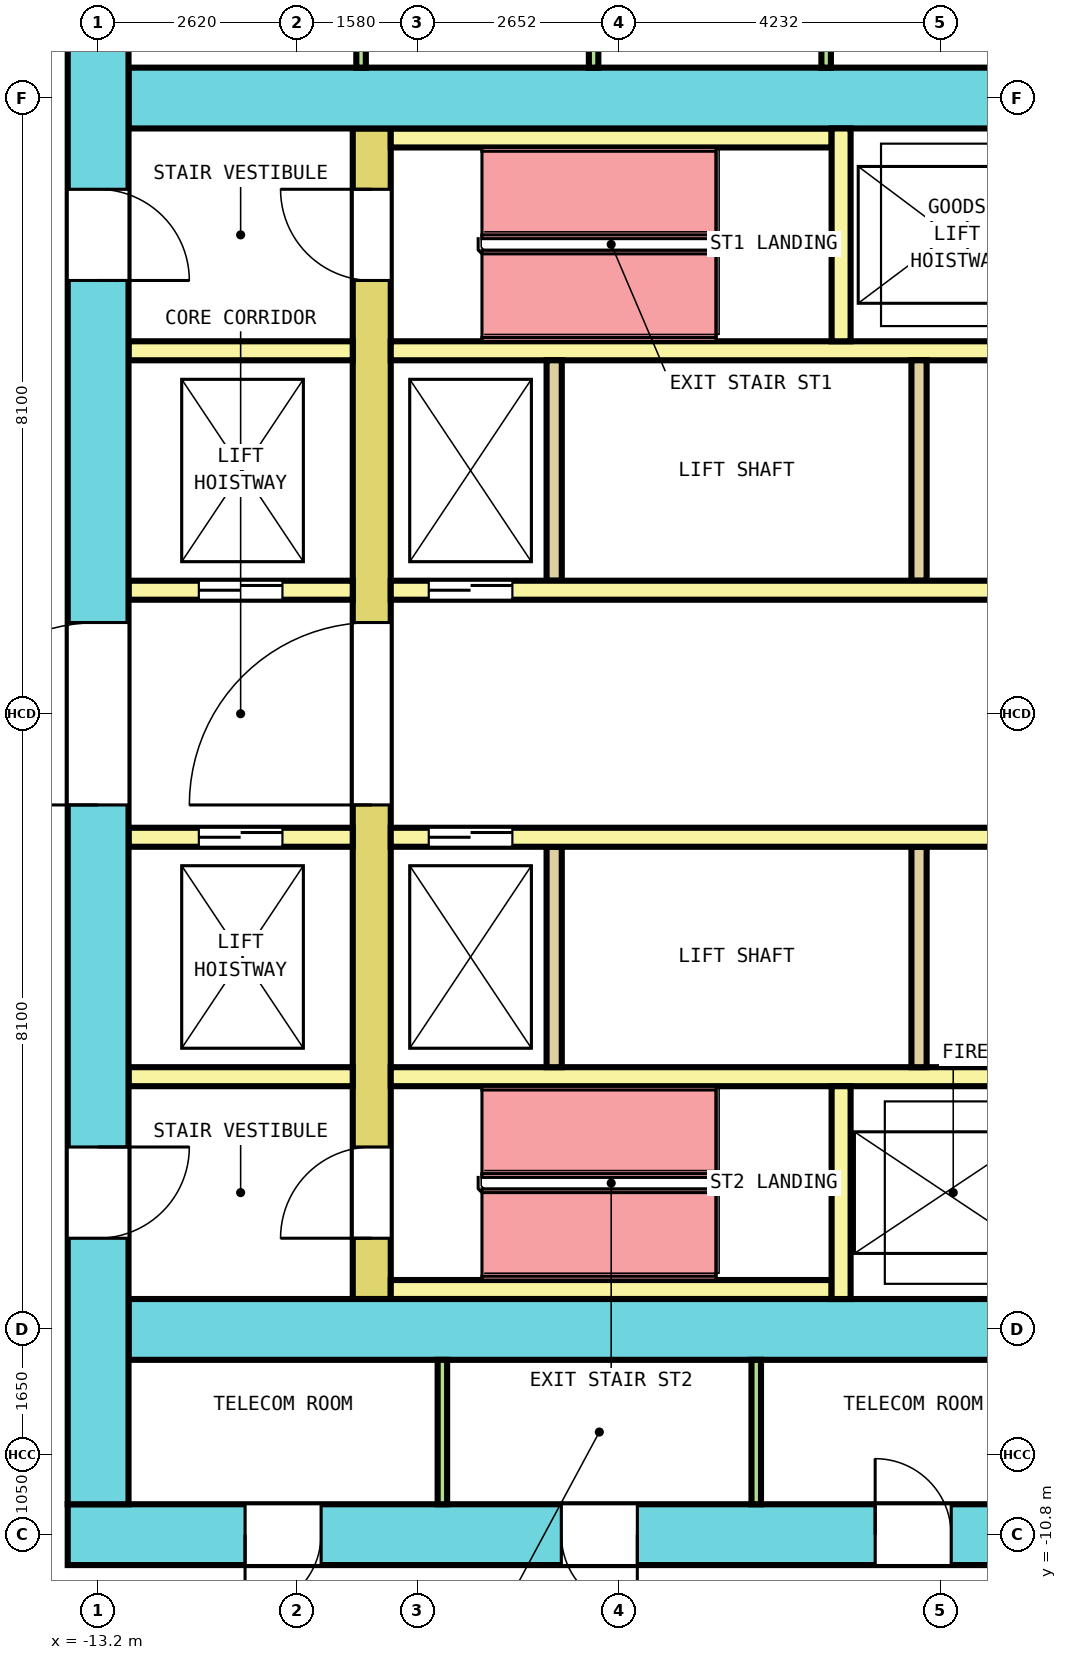
"""IFC4 building model, lengths in metres.
Left out: names, types, materials, properties, quantities, classifications, styles, units other than length and angle.
Written with IfcOpenShell. Run it as: python <this file> out.ifc"""

import sys

from ifc_helpers import new_model, si_unit, direction, frame, frame_2d, origin, place, context, subcontext, project, spatial, rectangle, extrude, element, fill, save


model = new_model("IFC4")
c1 = context("Model", 3, precision=1e-05, world=origin(), true_north=direction((0.0, 1.0)))
c2 = subcontext(c1, "Body", "Model", "MODEL_VIEW")
j1 = project(units=[si_unit("LENGTHUNIT", "METRE"), si_unit("PLANEANGLEUNIT", "RADIAN")], contexts=[c1])
p1 = place(None, origin())
s1 = spatial("IfcSite", under=j1, at=p1, CompositionType="ELEMENT")
p2 = place(p1, origin())
s2 = spatial("IfcBuilding", under=s1, at=p2, CompositionType="ELEMENT")
p3 = place(p2, frame((0.0, 0.0, 85.2)))
s3 = spatial("IfcBuildingStorey", under=s2, at=p3, CompositionType="ELEMENT", Elevation=85.2)
p4 = place(p3, frame((-13.6, -10.8, 0.0), z_axis=(0.0, 0.0, 1.0), x_axis=(1.0, 0.0, 0.0)))
e1 = element("IfcWall", 1, at=p4, inside=s3, PredefinedType="SHEAR", context=c2, shape_type="SweptSolid", body=[
    extrude(rectangle(XDim=27.2, YDim=0.8, at=frame_2d((13.6, 0.0))), origin(), (0.0, 0.0, 1.0), 4.1),
])
p5 = place(p4, frame((2.333, 0.0, 0.0)))
e2 = element("IfcOpeningElement", 2, at=p5, cuts=e1, PredefinedType="OPENING", context=c2, shape_type="SweptSolid", body=[
    extrude(rectangle(XDim=1.0, YDim=2.1, at=frame_2d((0.5, 1.05))), frame((0.0, 0.41, 0.0), z_axis=(0.0, -1.0, 0.0), x_axis=(1.0, 0.0, 0.0)), (0.0, 0.0, 1.0), 0.82),
])
p6 = place(p4, frame((6.494, 0.0, 0.0)))
e3 = element("IfcOpeningElement", 3, at=p6, cuts=e1, PredefinedType="OPENING", context=c2, shape_type="SweptSolid", body=[
    extrude(rectangle(XDim=1.0, YDim=2.1, at=frame_2d((0.5, 1.05))), frame((0.0, 0.41, 0.0), z_axis=(0.0, -1.0, 0.0), x_axis=(1.0, 0.0, 0.0)), (0.0, 0.0, 1.0), 0.82),
])
p7 = place(p4, frame((10.623, 0.0, 0.0)))
e4 = element("IfcOpeningElement", 4, at=p7, cuts=e1, PredefinedType="OPENING", context=c2, shape_type="SweptSolid", body=[
    extrude(rectangle(XDim=1.0, YDim=2.1, at=frame_2d((0.5, 1.05))), frame((0.0, 0.41, 0.0), z_axis=(0.0, -1.0, 0.0), x_axis=(1.0, 0.0, 0.0)), (0.0, 0.0, 1.0), 0.82),
])
p8 = place(p4, frame((19.16, 0.0, 0.0)))
e5 = element("IfcOpeningElement", 5, at=p8, cuts=e1, PredefinedType="OPENING", context=c2, shape_type="SweptSolid", body=[
    extrude(rectangle(XDim=1.0, YDim=2.1, at=frame_2d((0.5, 1.05))), frame((0.0, 0.41, 0.0), z_axis=(0.0, -1.0, 0.0), x_axis=(1.0, 0.0, 0.0)), (0.0, 0.0, 1.0), 0.82),
])
p9 = place(p4, frame((21.856, 0.0, 0.0)))
e6 = element("IfcOpeningElement", 6, at=p9, cuts=e1, PredefinedType="OPENING", context=c2, shape_type="SweptSolid", body=[
    extrude(rectangle(XDim=1.0, YDim=2.1, at=frame_2d((0.5, 1.05))), frame((0.0, 0.41, 0.0), z_axis=(0.0, -1.0, 0.0), x_axis=(1.0, 0.0, 0.0)), (0.0, 0.0, 1.0), 0.82),
])
p10 = place(p4, frame((24.583, 0.0, 0.0)))
e7 = element("IfcOpeningElement", 7, at=p10, cuts=e1, PredefinedType="OPENING", context=c2, shape_type="SweptSolid", body=[
    extrude(rectangle(XDim=1.0, YDim=2.1, at=frame_2d((0.5, 1.05))), frame((0.0, 0.41, 0.0), z_axis=(0.0, -1.0, 0.0), x_axis=(1.0, 0.0, 0.0)), (0.0, 0.0, 1.0), 0.82),
])
p11 = place(p4, frame((15.15, 0.0, 0.0)))
e8 = element("IfcOpeningElement", 8, at=p11, cuts=e1, PredefinedType="OPENING", context=c2, shape_type="SweptSolid", body=[
    extrude(rectangle(XDim=1.2, YDim=2.1, at=frame_2d((0.6, 1.05))), frame((0.0, 0.41, 0.0), z_axis=(0.0, -1.0, 0.0), x_axis=(1.0, 0.0, 0.0)), (0.0, 0.0, 1.0), 0.82),
])
p12 = place(p3, frame((-13.2, -10.4, 0.0), z_axis=(0.0, 0.0, 1.0), x_axis=(0.0, 1.0, 0.0)))
e9 = element("IfcWall", 9, at=p12, inside=s3, PredefinedType="SHEAR", context=c2, shape_type="SweptSolid", body=[
    extrude(rectangle(XDim=20.8, YDim=0.8, at=frame_2d((10.4, 0.0))), origin(), (0.0, 0.0, 1.0), 4.1),
])
p13 = place(p12, frame((9.2, 0.0, 0.0)))
e10 = element("IfcOpeningElement", 10, at=p13, cuts=e9, PredefinedType="OPENING", context=c2, shape_type="SweptSolid", body=[
    extrude(rectangle(XDim=2.4, YDim=2.1, at=frame_2d((1.2, 1.05))), frame((0.0, 0.41, 0.0), z_axis=(0.0, -1.0, 0.0), x_axis=(1.0, 0.0, 0.0)), (0.0, 0.0, 1.0), 0.82),
])
p14 = place(p12, frame((16.1, 0.0, 0.0)))
e11 = element("IfcOpeningElement", 11, at=p14, cuts=e9, PredefinedType="OPENING", context=c2, shape_type="SweptSolid", body=[
    extrude(rectangle(XDim=1.2, YDim=2.1, at=frame_2d((0.6, 1.05))), frame((0.0, 0.41, 0.0), z_axis=(0.0, -1.0, 0.0), x_axis=(1.0, 0.0, 0.0)), (0.0, 0.0, 1.0), 0.82),
])
p15 = place(p12, frame((3.5, 0.0, 0.0)))
e12 = element("IfcOpeningElement", 12, at=p15, cuts=e9, PredefinedType="OPENING", context=c2, shape_type="SweptSolid", body=[
    extrude(rectangle(XDim=1.2, YDim=2.1, at=frame_2d((0.6, 1.05))), frame((0.0, 0.41, 0.0), z_axis=(0.0, -1.0, 0.0), x_axis=(1.0, 0.0, 0.0)), (0.0, 0.0, 1.0), 0.82),
])
p16 = place(p3, frame((-12.8, 8.1, 0.0), z_axis=(0.0, 0.0, 1.0), x_axis=(1.0, 0.0, 0.0)))
e13 = element("IfcWall", 13, at=p16, inside=s3, PredefinedType="SHEAR", context=c2, shape_type="SweptSolid", body=[
    extrude(rectangle(XDim=25.6, YDim=0.8, at=frame_2d((12.8, 0.0))), origin(), (0.0, 0.0, 1.0), 4.1),
])
p17 = place(p16, frame((13.725, 0.0, 0.0)))
e14 = element("IfcOpeningElement", 14, at=p17, cuts=e13, PredefinedType="OPENING", context=c2, shape_type="SweptSolid", body=[
    extrude(rectangle(XDim=1.4, YDim=2.1, at=frame_2d((0.7, 1.05))), frame((0.0, 0.41, 0.0), z_axis=(0.0, -1.0, 0.0), x_axis=(1.0, 0.0, 0.0)), (0.0, 0.0, 1.0), 0.82),
])
p18 = place(p3, frame((-12.8, -8.1, 0.0), z_axis=(0.0, 0.0, 1.0), x_axis=(1.0, 0.0, 0.0)))
e15 = element("IfcWall", 15, at=p18, inside=s3, PredefinedType="SHEAR", context=c2, shape_type="SweptSolid", body=[
    extrude(rectangle(XDim=25.6, YDim=0.8, at=frame_2d((12.8, 0.0))), origin(), (0.0, 0.0, 1.0), 4.1),
])
p19 = place(p18, frame((14.35, 0.0, 0.0)))
e16 = element("IfcOpeningElement", 16, at=p19, cuts=e15, PredefinedType="OPENING", context=c2, shape_type="SweptSolid", body=[
    extrude(rectangle(XDim=1.2, YDim=2.1, at=frame_2d((0.6, 1.05))), frame((0.0, 0.41, 0.0), z_axis=(0.0, -1.0, 0.0), x_axis=(1.0, 0.0, 0.0)), (0.0, 0.0, 1.0), 0.82),
])
p20 = place(p3, frame((-9.6, -7.7, 0.0), z_axis=(0.0, 0.0, 1.0), x_axis=(0.0, 1.0, 0.0)))
e17 = element("IfcWall", 17, at=p20, inside=s3, PredefinedType="SHEAR", context=c2, shape_type="SweptSolid", body=[
    extrude(rectangle(XDim=15.4, YDim=0.5, at=frame_2d((7.7, 0.0))), origin(), (0.0, 0.0, 1.0), 4.1),
])
p21 = place(p20, frame((6.5, 0.0, 0.0)))
e18 = element("IfcOpeningElement", 18, at=p21, cuts=e17, PredefinedType="OPENING", context=c2, shape_type="SweptSolid", body=[
    extrude(rectangle(XDim=2.4, YDim=2.1, at=frame_2d((1.2, 1.05))), frame((0.0, 0.26, 0.0), z_axis=(0.0, -1.0, 0.0), x_axis=(1.0, 0.0, 0.0)), (0.0, 0.0, 1.0), 0.52),
])
p22 = place(p20, frame((13.4, 0.0, 0.0)))
e19 = element("IfcOpeningElement", 19, at=p22, cuts=e17, PredefinedType="OPENING", context=c2, shape_type="SweptSolid", body=[
    extrude(rectangle(XDim=1.2, YDim=2.1, at=frame_2d((0.6, 1.05))), frame((0.0, 0.26, 0.0), z_axis=(0.0, -1.0, 0.0), x_axis=(1.0, 0.0, 0.0)), (0.0, 0.0, 1.0), 0.52),
])
p23 = place(p20, frame((0.8, 0.0, 0.0)))
e20 = element("IfcOpeningElement", 20, at=p23, cuts=e17, PredefinedType="OPENING", context=c2, shape_type="SweptSolid", body=[
    extrude(rectangle(XDim=1.2, YDim=2.1, at=frame_2d((0.6, 1.05))), frame((0.0, 0.26, 0.0), z_axis=(0.0, -1.0, 0.0), x_axis=(1.0, 0.0, 0.0)), (0.0, 0.0, 1.0), 0.52),
])
p24 = place(p3, frame((-12.8, 1.625, 0.0), z_axis=(0.0, 0.0, 1.0), x_axis=(1.0, 0.0, 0.0)))
e21 = element("IfcWall", 21, at=p24, inside=s3, PredefinedType="SOLIDWALL", context=c2, shape_type="SweptSolid", body=[
    extrude(rectangle(XDim=2.95, YDim=0.25, at=frame_2d((1.475, 0.0))), origin(), (0.0, 0.0, 1.0), 4.1),
])
p25 = place(p24, frame((0.925, 0.0, 0.0)))
e22 = element("IfcOpeningElement", 22, at=p25, cuts=e21, PredefinedType="OPENING", context=c2, shape_type="SweptSolid", body=[
    extrude(rectangle(XDim=1.1, YDim=2.1, at=frame_2d((0.55, 1.05))), frame((0.0, 0.135, 0.0), z_axis=(0.0, -1.0, 0.0), x_axis=(1.0, 0.0, 0.0)), (0.0, 0.0, 1.0), 0.27),
])
p26 = place(p3, frame((-9.35, 1.625, 0.0), z_axis=(0.0, 0.0, 1.0), x_axis=(1.0, 0.0, 0.0)))
e23 = element("IfcWall", 23, at=p26, inside=s3, PredefinedType="SOLIDWALL", context=c2, shape_type="SweptSolid", body=[
    extrude(rectangle(XDim=18.7, YDim=0.25, at=frame_2d((9.35, 0.0))), origin(), (0.0, 0.0, 1.0), 4.1),
])
p27 = place(p26, frame((0.5, 0.0, 0.0)))
e24 = element("IfcOpeningElement", 24, at=p27, cuts=e23, PredefinedType="OPENING", context=c2, shape_type="SweptSolid", body=[
    extrude(rectangle(XDim=1.1, YDim=2.1, at=frame_2d((0.55, 1.05))), frame((0.0, 0.135, 0.0), z_axis=(0.0, -1.0, 0.0), x_axis=(1.0, 0.0, 0.0)), (0.0, 0.0, 1.0), 0.27),
])
p28 = place(p26, frame((17.1, 0.0, 0.0)))
e25 = element("IfcOpeningElement", 25, at=p28, cuts=e23, PredefinedType="OPENING", context=c2, shape_type="SweptSolid", body=[
    extrude(rectangle(XDim=1.1, YDim=2.1, at=frame_2d((0.55, 1.05))), frame((0.0, 0.135, 0.0), z_axis=(0.0, -1.0, 0.0), x_axis=(1.0, 0.0, 0.0)), (0.0, 0.0, 1.0), 0.27),
])
p29 = place(p3, frame((-12.8, 4.775, 0.0), z_axis=(0.0, 0.0, 1.0), x_axis=(1.0, 0.0, 0.0)))
e26 = element("IfcWall", 26, at=p29, inside=s3, PredefinedType="SOLIDWALL", context=c2, shape_type="SweptSolid", body=[
    extrude(rectangle(XDim=2.95, YDim=0.25, at=frame_2d((1.475, 0.0))), origin(), (0.0, 0.0, 1.0), 4.1),
])
p30 = place(p3, frame((-9.35, 4.775, 0.0), z_axis=(0.0, 0.0, 1.0), x_axis=(1.0, 0.0, 0.0)))
e27 = element("IfcWall", 27, at=p30, inside=s3, PredefinedType="SOLIDWALL", context=c2, shape_type="SweptSolid", body=[
    extrude(rectangle(XDim=18.7, YDim=0.25, at=frame_2d((9.35, 0.0))), origin(), (0.0, 0.0, 1.0), 4.1),
])
for number, where, z_axis, x_axis in (
    (28, (-7.2, 1.75, 0.0), (0.0, 0.0, 1.0), (0.0, 1.0, 0.0)),
    (29, (-2.4, 1.75, 0.0), (0.0, 0.0, 1.0), (0.0, 1.0, 0.0)),
):
    element("IfcWall", number, at=place(p3, frame(where, z_axis=z_axis, x_axis=x_axis)), inside=s3, PredefinedType="SOLIDWALL", context=c2, shape_type="SweptSolid", body=[
        extrude(rectangle(XDim=2.9, YDim=0.2, at=frame_2d((1.45, 0.0))), origin(), (0.0, 0.0, 1.0), 4.1),
    ])
p31 = place(p3, frame((-12.8, -1.625, 0.0), z_axis=(0.0, 0.0, 1.0), x_axis=(1.0, 0.0, 0.0)))
e30 = element("IfcWall", 30, at=p31, inside=s3, PredefinedType="SOLIDWALL", context=c2, shape_type="SweptSolid", body=[
    extrude(rectangle(XDim=2.95, YDim=0.25, at=frame_2d((1.475, 0.0))), origin(), (0.0, 0.0, 1.0), 4.1),
])
p32 = place(p31, frame((0.925, 0.0, 0.0)))
e31 = element("IfcOpeningElement", 31, at=p32, cuts=e30, PredefinedType="OPENING", context=c2, shape_type="SweptSolid", body=[
    extrude(rectangle(XDim=1.1, YDim=2.1, at=frame_2d((0.55, 1.05))), frame((0.0, 0.135, 0.0), z_axis=(0.0, -1.0, 0.0), x_axis=(1.0, 0.0, 0.0)), (0.0, 0.0, 1.0), 0.27),
])
p33 = place(p3, frame((-9.35, -1.625, 0.0), z_axis=(0.0, 0.0, 1.0), x_axis=(1.0, 0.0, 0.0)))
e32 = element("IfcWall", 32, at=p33, inside=s3, PredefinedType="SOLIDWALL", context=c2, shape_type="SweptSolid", body=[
    extrude(rectangle(XDim=18.7, YDim=0.25, at=frame_2d((9.35, 0.0))), origin(), (0.0, 0.0, 1.0), 4.1),
])
p34 = place(p33, frame((0.5, 0.0, 0.0)))
e33 = element("IfcOpeningElement", 33, at=p34, cuts=e32, PredefinedType="OPENING", context=c2, shape_type="SweptSolid", body=[
    extrude(rectangle(XDim=1.1, YDim=2.1, at=frame_2d((0.55, 1.05))), frame((0.0, 0.135, 0.0), z_axis=(0.0, -1.0, 0.0), x_axis=(1.0, 0.0, 0.0)), (0.0, 0.0, 1.0), 0.27),
])
p35 = place(p33, frame((17.1, 0.0, 0.0)))
e34 = element("IfcOpeningElement", 34, at=p35, cuts=e32, PredefinedType="OPENING", context=c2, shape_type="SweptSolid", body=[
    extrude(rectangle(XDim=1.1, YDim=2.1, at=frame_2d((0.55, 1.05))), frame((0.0, 0.135, 0.0), z_axis=(0.0, -1.0, 0.0), x_axis=(1.0, 0.0, 0.0)), (0.0, 0.0, 1.0), 0.27),
])
p36 = place(p3, frame((-12.8, -4.775, 0.0), z_axis=(0.0, 0.0, 1.0), x_axis=(1.0, 0.0, 0.0)))
e35 = element("IfcWall", 35, at=p36, inside=s3, PredefinedType="SOLIDWALL", context=c2, shape_type="SweptSolid", body=[
    extrude(rectangle(XDim=2.95, YDim=0.25, at=frame_2d((1.475, 0.0))), origin(), (0.0, 0.0, 1.0), 4.1),
])
p37 = place(p3, frame((-9.35, -4.775, 0.0), z_axis=(0.0, 0.0, 1.0), x_axis=(1.0, 0.0, 0.0)))
e36 = element("IfcWall", 36, at=p37, inside=s3, PredefinedType="SOLIDWALL", context=c2, shape_type="SweptSolid", body=[
    extrude(rectangle(XDim=18.7, YDim=0.25, at=frame_2d((9.35, 0.0))), origin(), (0.0, 0.0, 1.0), 4.1),
])
for number, where, z_axis, x_axis in (
    (37, (-7.2, -4.65, 0.0), (0.0, 0.0, 1.0), (0.0, 1.0, 0.0)),
    (38, (-2.4, -4.65, 0.0), (0.0, 0.0, 1.0), (0.0, 1.0, 0.0)),
):
    element("IfcWall", number, at=place(p3, frame(where, z_axis=z_axis, x_axis=x_axis)), inside=s3, PredefinedType="SOLIDWALL", context=c2, shape_type="SweptSolid", body=[
        extrude(rectangle(XDim=2.9, YDim=0.2, at=frame_2d((1.45, 0.0))), origin(), (0.0, 0.0, 1.0), 4.1),
    ])
p38 = place(p3, frame((-9.35, 7.575, 0.0), z_axis=(0.0, 0.0, 1.0), x_axis=(1.0, 0.0, 0.0)))
e39 = element("IfcWall", 39, at=p38, inside=s3, PredefinedType="SOLIDWALL", context=c2, shape_type="SweptSolid", body=[
    extrude(rectangle(XDim=5.8, YDim=0.25, at=frame_2d((2.9, 0.0))), origin(), (0.0, 0.0, 1.0), 4.1),
])
p39 = place(p3, frame((-3.425, 4.9, 0.0), z_axis=(0.0, 0.0, 1.0), x_axis=(0.0, 1.0, 0.0)))
e40 = element("IfcWall", 40, at=p39, inside=s3, PredefinedType="SOLIDWALL", context=c2, shape_type="SweptSolid", body=[
    extrude(rectangle(XDim=2.8, YDim=0.25, at=frame_2d((1.4, 0.0))), origin(), (0.0, 0.0, 1.0), 4.1),
])
p40 = place(p3, frame((-9.35, -7.575, 0.0), z_axis=(0.0, 0.0, 1.0), x_axis=(1.0, 0.0, 0.0)))
e41 = element("IfcWall", 41, at=p40, inside=s3, PredefinedType="SOLIDWALL", context=c2, shape_type="SweptSolid", body=[
    extrude(rectangle(XDim=5.8, YDim=0.25, at=frame_2d((2.9, 0.0))), origin(), (0.0, 0.0, 1.0), 4.1),
])
p41 = place(p3, frame((-3.425, -7.7, 0.0), z_axis=(0.0, 0.0, 1.0), x_axis=(0.0, 1.0, 0.0)))
e42 = element("IfcWall", 42, at=p41, inside=s3, PredefinedType="SOLIDWALL", context=c2, shape_type="SweptSolid", body=[
    extrude(rectangle(XDim=2.8, YDim=0.25, at=frame_2d((1.4, 0.0))), origin(), (0.0, 0.0, 1.0), 4.1),
])
for number, where, z_axis, x_axis in (
    (43, (-9.74, 8.5, 0.0), (0.0, 0.0, 1.0), (0.0, 1.0, 0.0)),
    (44, (-6.681, 8.5, 0.0), (0.0, 0.0, 1.0), (0.0, 1.0, 0.0)),
    (45, (-3.622, 8.5, 0.0), (0.0, 0.0, 1.0), (0.0, 1.0, 0.0)),
    (46, (-8.671, -10.4, 0.0), (0.0, 0.0, 1.0), (0.0, 1.0, 0.0)),
    (47, (-4.542, -10.4, 0.0), (0.0, 0.0, 1.0), (0.0, 1.0, 0.0)),
):
    element("IfcWall", number, at=place(p3, frame(where, z_axis=z_axis, x_axis=x_axis)), inside=s3, PredefinedType="PARTITIONING", context=c2, shape_type="SweptSolid", body=[
        extrude(rectangle(XDim=1.9, YDim=0.125, at=frame_2d((0.95, 0.0))), origin(), (0.0, 0.0, 1.0), 4.1),
    ])
p42 = place(p25, origin())
e48 = element("IfcDoor", 48, at=p42, inside=s3, OperationType="DOUBLE_DOOR_SLIDING", PredefinedType="DOOR", context=c2, shape_type="SweptSolid", body=[
    extrude(rectangle(XDim=1.1, YDim=2.1, at=frame_2d((0.55, 1.05))), frame((0.0, 0.075, 0.0), z_axis=(0.0, -1.0, 0.0), x_axis=(1.0, 0.0, 0.0)), (0.0, 0.0, 1.0), 0.15),
])
fill(e22, e48)
p43 = place(p27, origin())
e49 = element("IfcDoor", 49, at=p43, inside=s3, OperationType="DOUBLE_DOOR_SLIDING", PredefinedType="DOOR", context=c2, shape_type="SweptSolid", body=[
    extrude(rectangle(XDim=1.1, YDim=2.1, at=frame_2d((0.55, 1.05))), frame((0.0, 0.075, 0.0), z_axis=(0.0, -1.0, 0.0), x_axis=(1.0, 0.0, 0.0)), (0.0, 0.0, 1.0), 0.15),
])
fill(e24, e49)
p44 = place(p32, origin())
e50 = element("IfcDoor", 50, at=p44, inside=s3, OperationType="DOUBLE_DOOR_SLIDING", PredefinedType="DOOR", context=c2, shape_type="SweptSolid", body=[
    extrude(rectangle(XDim=1.1, YDim=2.1, at=frame_2d((0.55, 1.05))), frame((0.0, 0.075, 0.0), z_axis=(0.0, -1.0, 0.0), x_axis=(1.0, 0.0, 0.0)), (0.0, 0.0, 1.0), 0.15),
])
fill(e31, e50)
p45 = place(p34, origin())
e51 = element("IfcDoor", 51, at=p45, inside=s3, OperationType="DOUBLE_DOOR_SLIDING", PredefinedType="DOOR", context=c2, shape_type="SweptSolid", body=[
    extrude(rectangle(XDim=1.1, YDim=2.1, at=frame_2d((0.55, 1.05))), frame((0.0, 0.075, 0.0), z_axis=(0.0, -1.0, 0.0), x_axis=(1.0, 0.0, 0.0)), (0.0, 0.0, 1.0), 0.15),
])
fill(e33, e51)
p46 = place(p21, origin())
e52 = element("IfcDoor", 52, at=p46, inside=s3, OperationType="DOUBLE_DOOR_SINGLE_SWING", PredefinedType="DOOR", context=c2, shape_type="SweptSolid", body=[
    extrude(rectangle(XDim=2.4, YDim=2.1, at=frame_2d((1.2, 1.05))), frame((0.0, 0.2, 0.0), z_axis=(0.0, -1.0, 0.0), x_axis=(1.0, 0.0, 0.0)), (0.0, 0.0, 1.0), 0.4),
])
fill(e18, e52)
p47 = place(p13, origin())
e53 = element("IfcDoor", 53, at=p47, inside=s3, OperationType="DOUBLE_DOOR_SINGLE_SWING", PredefinedType="DOOR", context=c2, shape_type="SweptSolid", body=[
    extrude(rectangle(XDim=2.4, YDim=2.1, at=frame_2d((1.2, 1.05))), frame((0.0, 0.3, 0.0), z_axis=(0.0, -1.0, 0.0), x_axis=(1.0, 0.0, 0.0)), (0.0, 0.0, 1.0), 0.6),
])
fill(e10, e53)
p48 = place(p22, origin())
e54 = element("IfcDoor", 54, at=p48, inside=s3, OperationType="SINGLE_SWING_LEFT", PredefinedType="DOOR", context=c2, shape_type="SweptSolid", body=[
    extrude(rectangle(XDim=1.2, YDim=2.1, at=frame_2d((0.6, 1.05))), frame((0.0, 0.2, 0.0), z_axis=(0.0, -1.0, 0.0), x_axis=(1.0, 0.0, 0.0)), (0.0, 0.0, 1.0), 0.4),
])
fill(e19, e54)
p49 = place(p14, origin())
e55 = element("IfcDoor", 55, at=p49, inside=s3, OperationType="SINGLE_SWING_RIGHT", PredefinedType="DOOR", context=c2, shape_type="SweptSolid", body=[
    extrude(rectangle(XDim=1.2, YDim=2.1, at=frame_2d((0.6, 1.05))), frame((0.0, 0.3, 0.0), z_axis=(0.0, -1.0, 0.0), x_axis=(1.0, 0.0, 0.0)), (0.0, 0.0, 1.0), 0.6),
])
fill(e11, e55)
p50 = place(p23, origin())
e56 = element("IfcDoor", 56, at=p50, inside=s3, OperationType="SINGLE_SWING_LEFT", PredefinedType="DOOR", context=c2, shape_type="SweptSolid", body=[
    extrude(rectangle(XDim=1.2, YDim=2.1, at=frame_2d((0.6, 1.05))), frame((0.0, 0.2, 0.0), z_axis=(0.0, -1.0, 0.0), x_axis=(1.0, 0.0, 0.0)), (0.0, 0.0, 1.0), 0.4),
])
fill(e20, e56)
p51 = place(p15, origin())
e57 = element("IfcDoor", 57, at=p51, inside=s3, OperationType="SINGLE_SWING_RIGHT", PredefinedType="DOOR", context=c2, shape_type="SweptSolid", body=[
    extrude(rectangle(XDim=1.2, YDim=2.1, at=frame_2d((0.6, 1.05))), frame((0.0, 0.3, 0.0), z_axis=(0.0, -1.0, 0.0), x_axis=(1.0, 0.0, 0.0)), (0.0, 0.0, 1.0), 0.6),
])
fill(e12, e57)
p52 = place(p5, origin())
e58 = element("IfcDoor", 58, at=p52, inside=s3, OperationType="SINGLE_SWING_RIGHT", PredefinedType="DOOR", context=c2, shape_type="SweptSolid", body=[
    extrude(rectangle(XDim=1.0, YDim=2.1, at=frame_2d((0.5, 1.05))), frame((0.0, 0.3, 0.0), z_axis=(0.0, -1.0, 0.0), x_axis=(1.0, 0.0, 0.0)), (0.0, 0.0, 1.0), 0.6),
])
fill(e2, e58)
p53 = place(p6, origin())
e59 = element("IfcDoor", 59, at=p53, inside=s3, OperationType="SINGLE_SWING_LEFT", PredefinedType="DOOR", context=c2, shape_type="SweptSolid", body=[
    extrude(rectangle(XDim=1.0, YDim=2.1, at=frame_2d((0.5, 1.05))), frame((0.0, 0.3, 0.0), z_axis=(0.0, -1.0, 0.0), x_axis=(1.0, 0.0, 0.0)), (0.0, 0.0, 1.0), 0.6),
])
fill(e3, e59)
p54 = place(p7, origin())
e60 = element("IfcDoor", 60, at=p54, inside=s3, OperationType="SINGLE_SWING_RIGHT", PredefinedType="DOOR", context=c2, shape_type="SweptSolid", body=[
    extrude(rectangle(XDim=1.0, YDim=2.1, at=frame_2d((0.5, 1.05))), frame((0.0, 0.3, 0.0), z_axis=(0.0, -1.0, 0.0), x_axis=(1.0, 0.0, 0.0)), (0.0, 0.0, 1.0), 0.6),
])
fill(e4, e60)
save(model, sys.argv[1])
